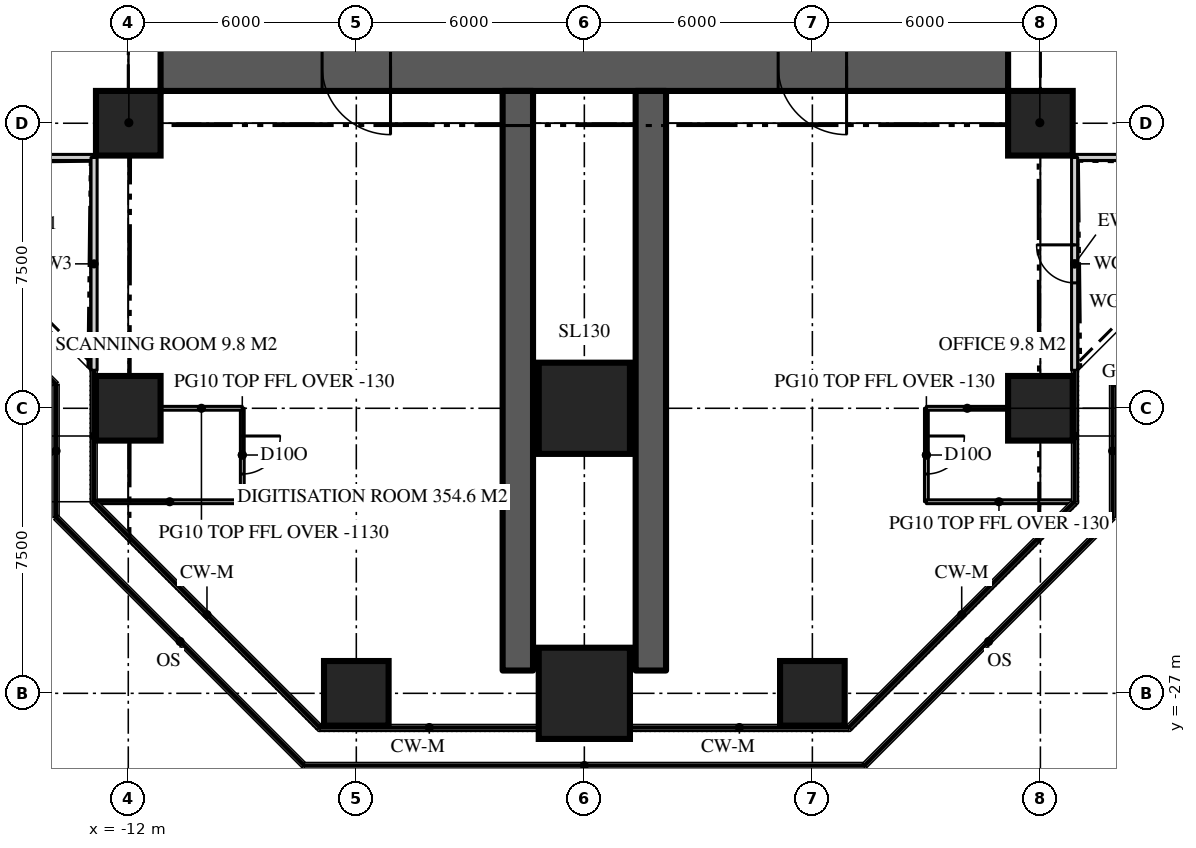
"""IFC4 building model, lengths in metres.
Left out: names, types, materials, properties, quantities, classifications, styles, units other than length and angle.
Written with IfcOpenShell. Run it as: python <this file> out.ifc"""

import sys

from ifc_helpers import new_model, si_unit, direction, frame, frame_2d, origin, origin_2d, place, context, subcontext, project, spatial, rectangle, extrude, element, fill, save


model = new_model("IFC4")
c1 = context("Model", 3, precision=1e-05, world=origin(), true_north=direction((0.0, 1.0)))
c2 = subcontext(c1, "Body", "Model", "MODEL_VIEW")
j1 = project(units=[si_unit("LENGTHUNIT", "METRE"), si_unit("PLANEANGLEUNIT", "RADIAN")], contexts=[c1])
p1 = place(None, origin())
s1 = spatial("IfcSite", under=j1, at=p1, CompositionType="ELEMENT")
p2 = place(p1, origin())
s2 = spatial("IfcBuilding", under=s1, at=p2, CompositionType="ELEMENT")
p3 = place(p2, frame((0.0, 0.0, 167.1)))
s3 = spatial("IfcBuildingStorey", under=s2, at=p3, CompositionType="ELEMENT", Elevation=167.1)
p4 = place(p3, frame((11.15, -10.5, 0.0), z_axis=(0.0, 0.0, 1.0), x_axis=(-1.0, 0.0, 0.0)))
e1 = element("IfcWall", 1, at=p4, inside=s3, PredefinedType="SHEAR", context=c2, shape_type="SweptSolid", body=[
    extrude(rectangle(XDim=22.3, YDim=1.3, at=frame_2d((11.15, 0.0))), origin(), (0.0, 0.0, 1.0), 3.9),
])
p5 = place(p4, frame((16.25, 0.0, 0.0)))
e2 = element("IfcOpeningElement", 2, at=p5, cuts=e1, PredefinedType="OPENING", context=c2, shape_type="SweptSolid", body=[
    extrude(rectangle(XDim=1.8, YDim=2.2, at=frame_2d((0.9, 1.1))), frame((0.0, 0.66, 0.0), z_axis=(0.0, -1.0, 0.0), x_axis=(1.0, 0.0, 0.0)), (0.0, 0.0, 1.0), 1.32),
])
p6 = place(p4, frame((4.25, 0.0, 0.0)))
e3 = element("IfcOpeningElement", 3, at=p6, cuts=e1, PredefinedType="OPENING", context=c2, shape_type="SweptSolid", body=[
    extrude(rectangle(XDim=1.8, YDim=2.2, at=frame_2d((0.9, 1.1))), frame((0.0, 0.66, 0.0), z_axis=(0.0, -1.0, 0.0), x_axis=(1.0, 0.0, 0.0)), (0.0, 0.0, 1.0), 1.32),
])
for number, where, z_axis, x_axis in (
    (4, (-1.75, -11.15, 0.0), (0.0, 0.0, 1.0), (0.0, -1.0, 0.0)),
    (5, (1.75, -11.15, 0.0), (0.0, 0.0, 1.0), (0.0, -1.0, 0.0)),
):
    element("IfcWall", number, at=place(p3, frame(where, z_axis=z_axis, x_axis=x_axis)), inside=s3, PredefinedType="SHEAR", context=c2, shape_type="SweptSolid", body=[
        extrude(rectangle(XDim=15.25, YDim=0.8, at=frame_2d((7.625, 0.0))), origin(), (0.0, 0.0, 1.0), 3.9),
    ])
p7 = place(p3, frame((-6.0, -27.0, 0.0), z_axis=(0.0, 0.0, 1.0), x_axis=(1.0, 0.0, 0.0)))
e6 = element("IfcColumn", 6, at=p7, inside=s3, PredefinedType="COLUMN", context=c2, shape_type="SweptSolid", body=[
    extrude(rectangle(XDim=1.7, YDim=1.7, at=origin_2d()), origin(), (0.0, 0.0, 1.0), 3.9),
])
p8 = place(p3, frame((0.0, -27.0, 0.0), z_axis=(0.0, 0.0, 1.0), x_axis=(1.0, 0.0, 0.0)))
e7 = element("IfcColumn", 7, at=p8, inside=s3, PredefinedType="COLUMN", context=c2, shape_type="SweptSolid", body=[
    extrude(rectangle(XDim=2.4, YDim=2.4, at=origin_2d()), origin(), (0.0, 0.0, 1.0), 3.9),
])
for number, where, z_axis, x_axis in (
    (8, (6.0, -27.0, 0.0), (0.0, 0.0, 1.0), (1.0, 0.0, 0.0)),
    (9, (-12.0, -19.5, 0.0), (0.0, 0.0, 1.0), (1.0, 0.0, 0.0)),
):
    element("IfcColumn", number, at=place(p3, frame(where, z_axis=z_axis, x_axis=x_axis)), inside=s3, PredefinedType="COLUMN", context=c2, shape_type="SweptSolid", body=[
        extrude(rectangle(XDim=1.7, YDim=1.7, at=origin_2d()), origin(), (0.0, 0.0, 1.0), 3.9),
    ])
p9 = place(p3, frame((0.0, -19.5, 0.0), z_axis=(0.0, 0.0, 1.0), x_axis=(1.0, 0.0, 0.0)))
e10 = element("IfcColumn", 10, at=p9, inside=s3, PredefinedType="COLUMN", context=c2, shape_type="SweptSolid", body=[
    extrude(rectangle(XDim=2.4, YDim=2.4, at=origin_2d()), origin(), (0.0, 0.0, 1.0), 3.9),
])
for number, where, z_axis, x_axis in (
    (11, (12.0, -19.5, 0.0), (0.0, 0.0, 1.0), (1.0, 0.0, 0.0)),
    (12, (-12.0, -12.0, 0.0), (0.0, 0.0, 1.0), (1.0, 0.0, 0.0)),
    (13, (12.0, -12.0, 0.0), (0.0, 0.0, 1.0), (1.0, 0.0, 0.0)),
):
    element("IfcColumn", number, at=place(p3, frame(where, z_axis=z_axis, x_axis=x_axis)), inside=s3, PredefinedType="COLUMN", context=c2, shape_type="SweptSolid", body=[
        extrude(rectangle(XDim=1.7, YDim=1.7, at=origin_2d()), origin(), (0.0, 0.0, 1.0), 3.9),
    ])
p10 = place(p3, frame((12.9, -12.9, 0.0), z_axis=(0.0, 0.0, 1.0), x_axis=(1.0, 0.0, 0.0)))
e14 = element("IfcWall", 14, at=p10, inside=s3, PredefinedType="SOLIDWALL", context=c2, shape_type="SweptSolid", body=[
    extrude(rectangle(XDim=5.6, YDim=0.16, at=frame_2d((2.8, 0.0))), origin(), (0.0, 0.0, 1.0), 3.77),
])
p11 = place(p3, frame((-18.5, -12.9, 0.0), z_axis=(0.0, 0.0, 1.0), x_axis=(1.0, 0.0, 0.0)))
e15 = element("IfcWall", 15, at=p11, inside=s3, PredefinedType="SOLIDWALL", context=c2, shape_type="SweptSolid", body=[
    extrude(rectangle(XDim=5.6, YDim=0.16, at=frame_2d((2.8, 0.0))), origin(), (0.0, 0.0, 1.0), 3.77),
])
p12 = place(p11, frame((2.3, 0.0, 0.0)))
e16 = element("IfcOpeningElement", 16, at=p12, cuts=e15, PredefinedType="OPENING", context=c2, shape_type="SweptSolid", body=[
    extrude(rectangle(XDim=1.0, YDim=2.2, at=frame_2d((0.5, 1.1))), frame((0.0, 0.09, 0.0), z_axis=(0.0, -1.0, 0.0), x_axis=(1.0, 0.0, 0.0)), (0.0, 0.0, 1.0), 0.18),
])
p13 = place(p3, frame((-12.9, -12.9, 0.0), z_axis=(0.0, 0.0, 1.0), x_axis=(0.0, -1.0, 0.0)))
e17 = element("IfcWall", 17, at=p13, inside=s3, PredefinedType="SOLIDWALL", context=c2, shape_type="SweptSolid", body=[
    extrude(rectangle(XDim=5.6, YDim=0.16, at=frame_2d((2.8, 0.0))), origin(), (0.0, 0.0, 1.0), 3.77),
])
p14 = place(p3, frame((12.9, -18.5, 0.0), z_axis=(0.0, 0.0, 1.0), x_axis=(0.0, 1.0, 0.0)))
e18 = element("IfcWall", 18, at=p14, inside=s3, PredefinedType="SOLIDWALL", context=c2, shape_type="SweptSolid", body=[
    extrude(rectangle(XDim=5.6, YDim=0.16, at=frame_2d((2.8, 0.0))), origin(), (0.0, 0.0, 1.0), 3.77),
])
p15 = place(p14, frame((2.3, 0.0, 0.0)))
e19 = element("IfcOpeningElement", 19, at=p15, cuts=e18, PredefinedType="OPENING", context=c2, shape_type="SweptSolid", body=[
    extrude(rectangle(XDim=1.0, YDim=2.2, at=frame_2d((0.5, 1.1))), frame((0.0, 0.09, 0.0), z_axis=(0.0, -1.0, 0.0), x_axis=(1.0, 0.0, 0.0)), (0.0, 0.0, 1.0), 0.18),
])
p16 = place(p3, frame((9.0, -19.5, 0.0), z_axis=(0.0, 0.0, 1.0), x_axis=(0.0, -1.0, 0.0)))
e20 = element("IfcWall", 20, at=p16, inside=s3, PredefinedType="PARTITIONING", context=c2, shape_type="SweptSolid", body=[
    extrude(rectangle(XDim=2.459, YDim=0.1, at=frame_2d((1.229, 0.0))), origin(), (0.0, 0.0, 1.0), 3.77),
])
p17 = place(p16, frame((0.729, 0.0, 0.0)))
e21 = element("IfcOpeningElement", 21, at=p17, cuts=e20, PredefinedType="OPENING", context=c2, shape_type="SweptSolid", body=[
    extrude(rectangle(XDim=1.0, YDim=2.2, at=frame_2d((0.5, 1.1))), frame((0.0, 0.06, 0.0), z_axis=(0.0, -1.0, 0.0), x_axis=(1.0, 0.0, 0.0)), (0.0, 0.0, 1.0), 0.12),
])
p18 = place(p3, frame((9.0, -19.5, 0.0), z_axis=(0.0, 0.0, 1.0), x_axis=(1.0, 0.0, 0.0)))
e22 = element("IfcWall", 22, at=p18, inside=s3, PredefinedType="PARTITIONING", context=c2, shape_type="SweptSolid", body=[
    extrude(rectangle(XDim=2.15, YDim=0.1, at=frame_2d((1.075, 0.0))), origin(), (0.0, 0.0, 1.0), 2.77),
])
p19 = place(p3, frame((9.0, -21.959, 0.0), z_axis=(0.0, 0.0, 1.0), x_axis=(1.0, 0.0, 0.0)))
e23 = element("IfcWall", 23, at=p19, inside=s3, PredefinedType="PARTITIONING", context=c2, shape_type="SweptSolid", body=[
    extrude(rectangle(XDim=3.82, YDim=0.1, at=frame_2d((1.91, 0.0))), origin(), (0.0, 0.0, 1.0), 3.77),
])
p20 = place(p3, frame((-9.0, -19.5, 0.0), z_axis=(0.0, 0.0, 1.0), x_axis=(0.0, -1.0, 0.0)))
e24 = element("IfcWall", 24, at=p20, inside=s3, PredefinedType="PARTITIONING", context=c2, shape_type="SweptSolid", body=[
    extrude(rectangle(XDim=2.459, YDim=0.1, at=frame_2d((1.229, 0.0))), origin(), (0.0, 0.0, 1.0), 3.77),
])
p21 = place(p20, frame((0.729, 0.0, 0.0)))
e25 = element("IfcOpeningElement", 25, at=p21, cuts=e24, PredefinedType="OPENING", context=c2, shape_type="SweptSolid", body=[
    extrude(rectangle(XDim=1.0, YDim=2.2, at=frame_2d((0.5, 1.1))), frame((0.0, 0.06, 0.0), z_axis=(0.0, -1.0, 0.0), x_axis=(1.0, 0.0, 0.0)), (0.0, 0.0, 1.0), 0.12),
])
p22 = place(p3, frame((-9.0, -19.5, 0.0), z_axis=(0.0, 0.0, 1.0), x_axis=(-1.0, 0.0, 0.0)))
e26 = element("IfcWall", 26, at=p22, inside=s3, PredefinedType="PARTITIONING", context=c2, shape_type="SweptSolid", body=[
    extrude(rectangle(XDim=2.15, YDim=0.1, at=frame_2d((1.075, 0.0))), origin(), (0.0, 0.0, 1.0), 2.77),
])
p23 = place(p3, frame((-9.0, -21.959, 0.0), z_axis=(0.0, 0.0, 1.0), x_axis=(-1.0, 0.0, 0.0)))
e27 = element("IfcWall", 27, at=p23, inside=s3, PredefinedType="PARTITIONING", context=c2, shape_type="SweptSolid", body=[
    extrude(rectangle(XDim=3.82, YDim=0.1, at=frame_2d((1.91, 0.0))), origin(), (0.0, 0.0, 1.0), 3.77),
])
for number, where, z_axis, x_axis in (
    (28, (-11.15, -11.15, 0.0), (0.0, 0.0, 1.0), (-0.707, -0.707, 0.0)),
    (29, (11.15, -11.15, 0.0), (0.0, 0.0, 1.0), (0.707, -0.707, 0.0)),
):
    element("IfcWall", number, at=place(p3, frame(where, z_axis=z_axis, x_axis=x_axis)), inside=s3, PredefinedType="PARTITIONING", context=c2, shape_type="SweptSolid", body=[
        extrude(rectangle(XDim=2.362, YDim=0.15, at=frame_2d((1.181, 0.0))), origin(), (0.0, 0.0, 1.0), 3.22),
    ])
p24 = place(p15, origin())
e30 = element("IfcDoor", 30, at=p24, inside=s3, OperationType="SINGLE_SWING_RIGHT", PredefinedType="DOOR", context=c2, shape_type="SweptSolid", body=[
    extrude(rectangle(XDim=1.0, YDim=2.2, at=frame_2d((0.5, 1.1))), frame((0.0, 0.025, 0.0), z_axis=(0.0, -1.0, 0.0), x_axis=(1.0, 0.0, 0.0)), (0.0, 0.0, 1.0), 0.05),
])
fill(e19, e30)
p25 = place(p5, origin())
e31 = element("IfcDoor", 31, at=p25, inside=s3, OperationType="DOUBLE_DOOR_DOUBLE_SWING", PredefinedType="DOOR", context=c2, shape_type="SweptSolid", body=[
    extrude(rectangle(XDim=1.8, YDim=2.2, at=frame_2d((0.9, 1.1))), frame((0.0, 0.025, 0.0), z_axis=(0.0, -1.0, 0.0), x_axis=(1.0, 0.0, 0.0)), (0.0, 0.0, 1.0), 0.05),
])
fill(e2, e31)
p26 = place(p6, origin())
e32 = element("IfcDoor", 32, at=p26, inside=s3, OperationType="DOUBLE_DOOR_DOUBLE_SWING", PredefinedType="DOOR", context=c2, shape_type="SweptSolid", body=[
    extrude(rectangle(XDim=1.8, YDim=2.2, at=frame_2d((0.9, 1.1))), frame((0.0, 0.025, 0.0), z_axis=(0.0, -1.0, 0.0), x_axis=(1.0, 0.0, 0.0)), (0.0, 0.0, 1.0), 0.05),
])
fill(e3, e32)
p27 = place(p17, origin())
e33 = element("IfcDoor", 33, at=p27, inside=s3, OperationType="SINGLE_SWING_LEFT", PredefinedType="DOOR", context=c2, shape_type="SweptSolid", body=[
    extrude(rectangle(XDim=1.0, YDim=2.2, at=frame_2d((0.5, 1.1))), frame((0.0, 0.025, 0.0), z_axis=(0.0, -1.0, 0.0), x_axis=(1.0, 0.0, 0.0)), (0.0, 0.0, 1.0), 0.05),
])
fill(e21, e33)
p28 = place(p21, origin())
e34 = element("IfcDoor", 34, at=p28, inside=s3, OperationType="SINGLE_SWING_LEFT", PredefinedType="DOOR", context=c2, shape_type="SweptSolid", body=[
    extrude(rectangle(XDim=1.0, YDim=2.2, at=frame_2d((0.5, 1.1))), frame((0.0, 0.025, 0.0), z_axis=(0.0, -1.0, 0.0), x_axis=(1.0, 0.0, 0.0)), (0.0, 0.0, 1.0), 0.05),
])
fill(e25, e34)
save(model, sys.argv[1])
